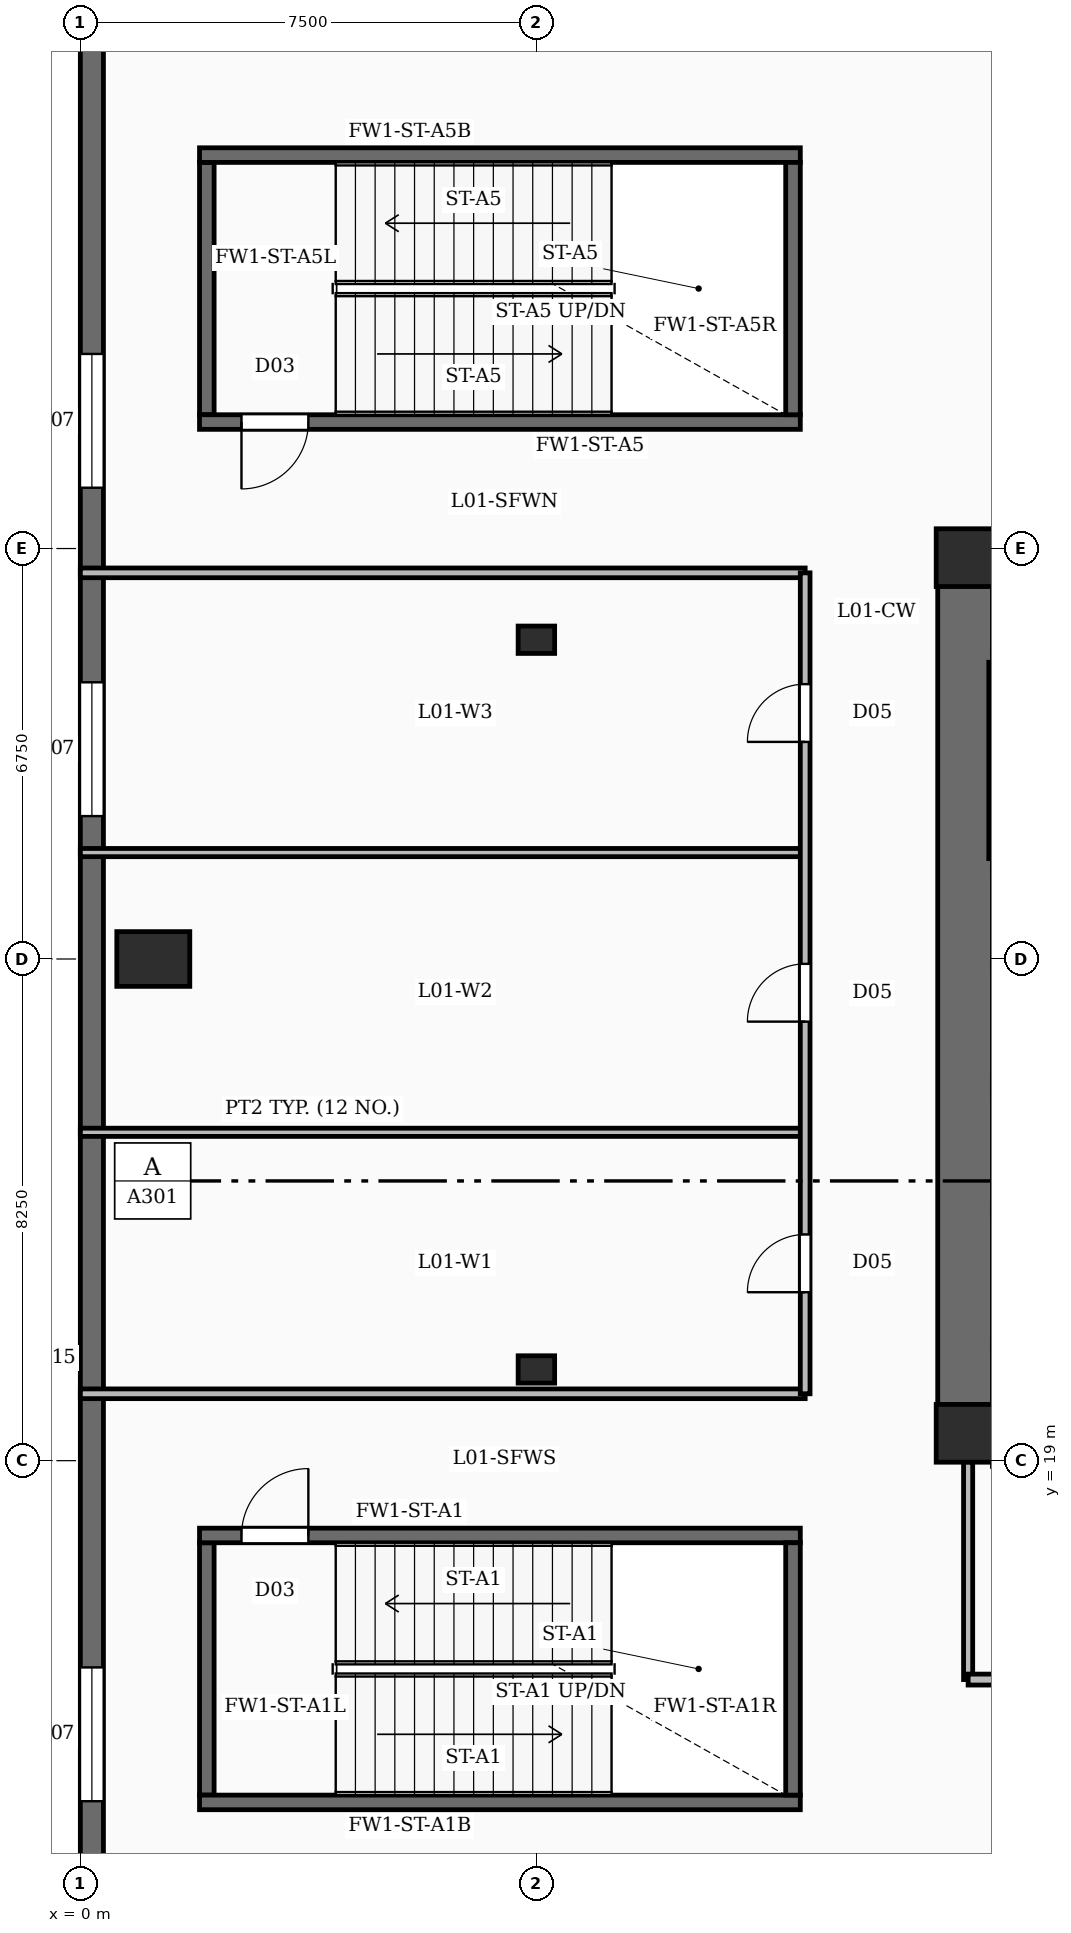
"""IFC4 building model, lengths in metres.
Left out: names, types, materials, properties, quantities, classifications, styles, units other than length and angle.
Written with IfcOpenShell. Run it as: python <this file> out.ifc"""

import sys

from ifc_helpers import new_model, si_unit, direction, frame, frame_2d, origin, origin_2d, place, context, subcontext, project, spatial, rectangle, extrude, element, fill, save


model = new_model("IFC4")
c1 = context("Model", 3, precision=1e-05, world=origin(), true_north=direction((0.0, 1.0)))
c2 = subcontext(c1, "Body", "Model", "MODEL_VIEW")
j1 = project(units=[si_unit("LENGTHUNIT", "METRE"), si_unit("PLANEANGLEUNIT", "RADIAN")], contexts=[c1])
p1 = place(None, origin())
s1 = spatial("IfcSite", under=j1, at=p1, CompositionType="ELEMENT")
p2 = place(p1, origin())
s2 = spatial("IfcBuilding", under=s1, at=p2, CompositionType="ELEMENT")
p3 = place(p2, frame((0.0, 0.0, 8.0)))
s3 = spatial("IfcBuildingStorey", under=s2, at=p3, CompositionType="ELEMENT", Elevation=8.0)
p4 = place(p3, frame((14.55, 19.0, -0.35), z_axis=(0.0, 0.0, 1.0), x_axis=(0.0, 1.0, 0.0)))
e1 = element("IfcWall", 1, at=p4, inside=s3, PredefinedType="SHEAR", context=c2, shape_type="SweptSolid", body=[
    extrude(rectangle(XDim=15.3, YDim=0.9, at=frame_2d((7.65, 0.0))), origin(), (0.0, 0.0, 1.0), 5.0),
])
for number, where, z_axis, x_axis in (
    (2, (14.55, 19.45, -0.35), (0.0, 0.0, 1.0), (1.0, 0.0, 0.0)),
    (3, (14.55, 33.85, -0.35), (0.0, 0.0, 1.0), (1.0, 0.0, 0.0)),
):
    element("IfcColumn", number, at=place(p3, frame(where, z_axis=z_axis, x_axis=x_axis)), inside=s3, PredefinedType="COLUMN", context=c2, shape_type="SweptSolid", body=[
        extrude(rectangle(XDim=0.95, YDim=0.95, at=origin_2d()), origin(), (0.0, 0.0, 1.0), 5.0),
    ])
p5 = place(p3, frame((1.2, 27.25, -0.35), z_axis=(0.0, 0.0, 1.0), x_axis=(1.0, 0.0, 0.0)))
e4 = element("IfcColumn", 4, at=p5, inside=s3, PredefinedType="COLUMN", context=c2, shape_type="SweptSolid", body=[
    extrude(rectangle(XDim=1.2, YDim=0.9, at=origin_2d()), origin(), (0.0, 0.0, 1.0), 5.0),
])
for number, where, z_axis, x_axis in (
    (5, (7.5, 20.5, -0.35), (0.0, 0.0, 1.0), (1.0, 0.0, 0.0)),
    (6, (7.5, 32.5, -0.35), (0.0, 0.0, 1.0), (1.0, 0.0, 0.0)),
):
    element("IfcColumn", number, at=place(p3, frame(where, z_axis=z_axis, x_axis=x_axis)), inside=s3, PredefinedType="PILASTER", context=c2, shape_type="SweptSolid", body=[
        extrude(rectangle(XDim=0.6, YDim=0.45, at=origin_2d()), origin(), (0.0, 0.0, 1.0), 5.0),
    ])
p6 = place(p3, frame((0.19, 5.4, 0.0), z_axis=(0.0, 0.0, 1.0), x_axis=(0.0, 1.0, 0.0)))
e7 = element("IfcWall", 7, at=p6, inside=s3, PredefinedType="SOLIDWALL", context=c2, shape_type="SweptSolid", body=[
    extrude(rectangle(XDim=43.7, YDim=0.38, at=frame_2d((21.85, 0.0))), origin(), (0.0, 0.0, 1.0), 4.65),
])
p7 = place(p6, frame((2.6, 0.0, 0.95)))
e8 = element("IfcOpeningElement", 8, at=p7, cuts=e7, PredefinedType="OPENING", context=c2, shape_type="SweptSolid", body=[
    extrude(rectangle(XDim=2.2, YDim=2.5, at=frame_2d((1.1, 1.25))), frame((0.0, 0.2, 0.0), z_axis=(0.0, -1.0, 0.0), x_axis=(1.0, 0.0, 0.0)), (0.0, 0.0, 1.0), 0.4),
])
p8 = place(p6, frame((8.0, 0.0, 0.95)))
e9 = element("IfcOpeningElement", 9, at=p8, cuts=e7, PredefinedType="OPENING", context=c2, shape_type="SweptSolid", body=[
    extrude(rectangle(XDim=2.2, YDim=2.5, at=frame_2d((1.1, 1.25))), frame((0.0, 0.2, 0.0), z_axis=(0.0, -1.0, 0.0), x_axis=(1.0, 0.0, 0.0)), (0.0, 0.0, 1.0), 0.4),
])
p9 = place(p6, frame((24.2, 0.0, 0.95)))
e10 = element("IfcOpeningElement", 10, at=p9, cuts=e7, PredefinedType="OPENING", context=c2, shape_type="SweptSolid", body=[
    extrude(rectangle(XDim=2.2, YDim=2.5, at=frame_2d((1.1, 1.25))), frame((0.0, 0.2, 0.0), z_axis=(0.0, -1.0, 0.0), x_axis=(1.0, 0.0, 0.0)), (0.0, 0.0, 1.0), 0.4),
])
p10 = place(p6, frame((29.6, 0.0, 0.95)))
e11 = element("IfcOpeningElement", 11, at=p10, cuts=e7, PredefinedType="OPENING", context=c2, shape_type="SweptSolid", body=[
    extrude(rectangle(XDim=2.2, YDim=2.5, at=frame_2d((1.1, 1.25))), frame((0.0, 0.2, 0.0), z_axis=(0.0, -1.0, 0.0), x_axis=(1.0, 0.0, 0.0)), (0.0, 0.0, 1.0), 0.4),
])
p11 = place(p3, frame((1.96, 17.77, 0.0), z_axis=(0.0, 0.0, 1.0), x_axis=(1.0, 0.0, 0.0)))
e12 = element("IfcWall", 12, at=p11, inside=s3, PredefinedType="SOLIDWALL", context=c2, shape_type="SweptSolid", body=[
    extrude(rectangle(XDim=9.88, YDim=0.24, at=frame_2d((4.94, 0.0))), origin(), (0.0, 0.0, 1.0), 4.65),
])
p12 = place(p11, frame((0.69, 0.0, 0.0)))
e13 = element("IfcOpeningElement", 13, at=p12, cuts=e12, PredefinedType="OPENING", context=c2, shape_type="SweptSolid", body=[
    extrude(rectangle(XDim=1.1, YDim=2.15, at=frame_2d((0.55, 1.075))), frame((0.0, 0.13, 0.0), z_axis=(0.0, -1.0, 0.0), x_axis=(1.0, 0.0, 0.0)), (0.0, 0.0, 1.0), 0.26),
])
p13 = place(p3, frame((1.96, 13.38, 0.0), z_axis=(0.0, 0.0, 1.0), x_axis=(1.0, 0.0, 0.0)))
e14 = element("IfcWall", 14, at=p13, inside=s3, PredefinedType="SOLIDWALL", context=c2, shape_type="SweptSolid", body=[
    extrude(rectangle(XDim=9.88, YDim=0.24, at=frame_2d((4.94, 0.0))), origin(), (0.0, 0.0, 1.0), 4.65),
])
for number, where, z_axis, x_axis in (
    (15, (2.08, 13.5, 0.0), (0.0, 0.0, 1.0), (0.0, 1.0, 0.0)),
    (16, (11.72, 13.5, 0.0), (0.0, 0.0, 1.0), (0.0, 1.0, 0.0)),
):
    element("IfcWall", number, at=place(p3, frame(where, z_axis=z_axis, x_axis=x_axis)), inside=s3, PredefinedType="SOLIDWALL", context=c2, shape_type="SweptSolid", body=[
        extrude(rectangle(XDim=4.15, YDim=0.24, at=frame_2d((2.075, 0.0))), origin(), (0.0, 0.0, 1.0), 4.65),
    ])
p14 = place(p3, frame((11.84, 36.08, 0.0), z_axis=(0.0, 0.0, 1.0), x_axis=(-1.0, 0.0, 0.0)))
e17 = element("IfcWall", 17, at=p14, inside=s3, PredefinedType="SOLIDWALL", context=c2, shape_type="SweptSolid", body=[
    extrude(rectangle(XDim=9.88, YDim=0.24, at=frame_2d((4.94, 0.0))), origin(), (0.0, 0.0, 1.0), 4.65),
])
p15 = place(p14, frame((8.09, 0.0, 0.0)))
e18 = element("IfcOpeningElement", 18, at=p15, cuts=e17, PredefinedType="OPENING", context=c2, shape_type="SweptSolid", body=[
    extrude(rectangle(XDim=1.1, YDim=2.15, at=frame_2d((0.55, 1.075))), frame((0.0, 0.13, 0.0), z_axis=(0.0, -1.0, 0.0), x_axis=(1.0, 0.0, 0.0)), (0.0, 0.0, 1.0), 0.26),
])
p16 = place(p3, frame((1.96, 40.47, 0.0), z_axis=(0.0, 0.0, 1.0), x_axis=(1.0, 0.0, 0.0)))
e19 = element("IfcWall", 19, at=p16, inside=s3, PredefinedType="SOLIDWALL", context=c2, shape_type="SweptSolid", body=[
    extrude(rectangle(XDim=9.88, YDim=0.24, at=frame_2d((4.94, 0.0))), origin(), (0.0, 0.0, 1.0), 4.65),
])
for number, where, z_axis, x_axis in (
    (20, (2.08, 36.2, 0.0), (0.0, 0.0, 1.0), (0.0, 1.0, 0.0)),
    (21, (11.72, 36.2, 0.0), (0.0, 0.0, 1.0), (0.0, 1.0, 0.0)),
):
    element("IfcWall", number, at=place(p3, frame(where, z_axis=z_axis, x_axis=x_axis)), inside=s3, PredefinedType="SOLIDWALL", context=c2, shape_type="SweptSolid", body=[
        extrude(rectangle(XDim=4.15, YDim=0.24, at=frame_2d((2.075, 0.0))), origin(), (0.0, 0.0, 1.0), 4.65),
    ])
p17 = place(p3, frame((15.06, 28.9, 0.0), z_axis=(0.0, 0.0, 1.0), x_axis=(0.0, 1.0, 0.0)))
e22 = element("IfcWall", 22, at=p17, inside=s3, PredefinedType="SOLIDWALL", context=c2, shape_type="SweptSolid", body=[
    extrude(rectangle(XDim=3.23, YDim=0.24, at=frame_2d((1.615, 0.0))), origin(), (0.0, 0.0, 1.0), 4.65),
])
p18 = place(p3, frame((14.6, 15.4, 0.0), z_axis=(0.0, 0.0, 1.0), x_axis=(1.0, 0.0, 0.0)))
e23 = element("IfcWall", 23, at=p18, inside=s3, PredefinedType="PARTITIONING", context=c2, shape_type="SweptSolid", body=[
    extrude(rectangle(XDim=9.9, YDim=0.18, at=frame_2d((4.95, 0.0))), origin(), (0.0, 0.0, 1.0), 3.71),
])
p19 = place(p18, frame((1.99, 0.0, 0.0)))
e24 = element("IfcOpeningElement", 24, at=p19, cuts=e23, PredefinedType="OPENING", context=c2, shape_type="SweptSolid", body=[
    extrude(rectangle(XDim=0.92, YDim=2.1, at=frame_2d((0.46, 1.05))), frame((0.0, 0.1, 0.0), z_axis=(0.0, -1.0, 0.0), x_axis=(1.0, 0.0, 0.0)), (0.0, 0.0, 1.0), 0.2),
])
p20 = place(p18, frame((6.94, 0.0, 0.0)))
e25 = element("IfcOpeningElement", 25, at=p20, cuts=e23, PredefinedType="OPENING", context=c2, shape_type="SweptSolid", body=[
    extrude(rectangle(XDim=0.92, YDim=2.1, at=frame_2d((0.46, 1.05))), frame((0.0, 0.1, 0.0), z_axis=(0.0, -1.0, 0.0), x_axis=(1.0, 0.0, 0.0)), (0.0, 0.0, 1.0), 0.2),
])
p21 = place(p3, frame((14.6, 15.4, 0.0), z_axis=(0.0, 0.0, 1.0), x_axis=(0.0, 1.0, 0.0)))
e26 = element("IfcWall", 26, at=p21, inside=s3, PredefinedType="PARTITIONING", context=c2, shape_type="SweptSolid", body=[
    extrude(rectangle(XDim=3.58, YDim=0.15, at=frame_2d((1.79, 0.0))), origin(), (0.0, 0.0, 1.0), 3.71),
])
for number, where, z_axis, x_axis in (
    (27, (0.0, 24.4, 0.0), (0.0, 0.0, 1.0), (1.0, 0.0, 0.0)),
    (28, (0.0, 29.0, 0.0), (0.0, 0.0, 1.0), (1.0, 0.0, 0.0)),
):
    element("IfcWall", number, at=place(p3, frame(where, z_axis=z_axis, x_axis=x_axis)), inside=s3, PredefinedType="PARTITIONING", context=c2, shape_type="SweptSolid", body=[
        extrude(rectangle(XDim=11.92, YDim=0.135, at=frame_2d((5.96, 0.0))), origin(), (0.0, 0.0, 1.0), 3.71),
    ])
p22 = place(p3, frame((11.92, 20.1, 0.0), z_axis=(0.0, 0.0, 1.0), x_axis=(0.0, 1.0, 0.0)))
e29 = element("IfcWall", 29, at=p22, inside=s3, PredefinedType="PARTITIONING", context=c2, shape_type="SweptSolid", body=[
    extrude(rectangle(XDim=13.5, YDim=0.16, at=frame_2d((6.75, 0.0))), origin(), (0.0, 0.0, 1.0), 3.71),
])
p23 = place(p22, frame((1.67, 0.0, 0.0)))
e30 = element("IfcOpeningElement", 30, at=p23, cuts=e29, PredefinedType="OPENING", context=c2, shape_type="SweptSolid", body=[
    extrude(rectangle(XDim=0.95, YDim=2.15, at=frame_2d((0.475, 1.075))), frame((0.0, 0.09, 0.0), z_axis=(0.0, -1.0, 0.0), x_axis=(1.0, 0.0, 0.0)), (0.0, 0.0, 1.0), 0.18),
])
p24 = place(p22, frame((6.12, 0.0, 0.0)))
e31 = element("IfcOpeningElement", 31, at=p24, cuts=e29, PredefinedType="OPENING", context=c2, shape_type="SweptSolid", body=[
    extrude(rectangle(XDim=0.95, YDim=2.15, at=frame_2d((0.475, 1.075))), frame((0.0, 0.09, 0.0), z_axis=(0.0, -1.0, 0.0), x_axis=(1.0, 0.0, 0.0)), (0.0, 0.0, 1.0), 0.18),
])
p25 = place(p22, frame((10.72, 0.0, 0.0)))
e32 = element("IfcOpeningElement", 32, at=p25, cuts=e29, PredefinedType="OPENING", context=c2, shape_type="SweptSolid", body=[
    extrude(rectangle(XDim=0.95, YDim=2.15, at=frame_2d((0.475, 1.075))), frame((0.0, 0.09, 0.0), z_axis=(0.0, -1.0, 0.0), x_axis=(1.0, 0.0, 0.0)), (0.0, 0.0, 1.0), 0.18),
])
for number, where, z_axis, x_axis in (
    (33, (0.0, 20.1, 0.0), (0.0, 0.0, 1.0), (1.0, 0.0, 0.0)),
    (34, (0.0, 33.6, 0.0), (0.0, 0.0, 1.0), (1.0, 0.0, 0.0)),
):
    element("IfcWall", number, at=place(p3, frame(where, z_axis=z_axis, x_axis=x_axis)), inside=s3, PredefinedType="PARTITIONING", context=c2, shape_type="SweptSolid", body=[
        extrude(rectangle(XDim=11.92, YDim=0.16, at=frame_2d((5.96, 0.0))), origin(), (0.0, 0.0, 1.0), 3.71),
    ])
p26 = place(p8, origin())
e35 = element("IfcWindow", 35, at=p26, inside=s3, PartitioningType="DOUBLE_PANEL_VERTICAL", PredefinedType="WINDOW", context=c2, shape_type="SweptSolid", body=[
    extrude(rectangle(XDim=2.2, YDim=2.5, at=frame_2d((1.1, 1.25))), frame((0.0, 0.03, 0.0), z_axis=(0.0, -1.0, 0.0), x_axis=(1.0, 0.0, 0.0)), (0.0, 0.0, 1.0), 0.06),
])
fill(e9, e35)
p27 = place(p9, origin())
e36 = element("IfcWindow", 36, at=p27, inside=s3, PartitioningType="DOUBLE_PANEL_VERTICAL", PredefinedType="WINDOW", context=c2, shape_type="SweptSolid", body=[
    extrude(rectangle(XDim=2.2, YDim=2.5, at=frame_2d((1.1, 1.25))), frame((0.0, 0.03, 0.0), z_axis=(0.0, -1.0, 0.0), x_axis=(1.0, 0.0, 0.0)), (0.0, 0.0, 1.0), 0.06),
])
fill(e10, e36)
p28 = place(p10, origin())
e37 = element("IfcWindow", 37, at=p28, inside=s3, PartitioningType="DOUBLE_PANEL_VERTICAL", PredefinedType="WINDOW", context=c2, shape_type="SweptSolid", body=[
    extrude(rectangle(XDim=2.2, YDim=2.5, at=frame_2d((1.1, 1.25))), frame((0.0, 0.03, 0.0), z_axis=(0.0, -1.0, 0.0), x_axis=(1.0, 0.0, 0.0)), (0.0, 0.0, 1.0), 0.06),
])
fill(e11, e37)
p29 = place(p12, origin())
e38 = element("IfcDoor", 38, at=p29, inside=s3, OperationType="SINGLE_SWING_RIGHT", PredefinedType="DOOR", context=c2, shape_type="SweptSolid", body=[
    extrude(rectangle(XDim=1.1, YDim=2.15, at=frame_2d((0.55, 1.075))), frame((0.0, 0.025, 0.0), z_axis=(0.0, -1.0, 0.0), x_axis=(1.0, 0.0, 0.0)), (0.0, 0.0, 1.0), 0.05),
])
fill(e13, e38)
p30 = place(p15, origin())
e39 = element("IfcDoor", 39, at=p30, inside=s3, OperationType="SINGLE_SWING_RIGHT", PredefinedType="DOOR", context=c2, shape_type="SweptSolid", body=[
    extrude(rectangle(XDim=1.1, YDim=2.15, at=frame_2d((0.55, 1.075))), frame((0.0, 0.025, 0.0), z_axis=(0.0, -1.0, 0.0), x_axis=(1.0, 0.0, 0.0)), (0.0, 0.0, 1.0), 0.05),
])
fill(e18, e39)
p31 = place(p23, origin())
e40 = element("IfcDoor", 40, at=p31, inside=s3, OperationType="SINGLE_SWING_LEFT", PredefinedType="DOOR", context=c2, shape_type="SweptSolid", body=[
    extrude(rectangle(XDim=0.95, YDim=2.15, at=frame_2d((0.475, 1.075))), frame((0.0, 0.025, 0.0), z_axis=(0.0, -1.0, 0.0), x_axis=(1.0, 0.0, 0.0)), (0.0, 0.0, 1.0), 0.05),
])
fill(e30, e40)
p32 = place(p24, origin())
e41 = element("IfcDoor", 41, at=p32, inside=s3, OperationType="SINGLE_SWING_LEFT", PredefinedType="DOOR", context=c2, shape_type="SweptSolid", body=[
    extrude(rectangle(XDim=0.95, YDim=2.15, at=frame_2d((0.475, 1.075))), frame((0.0, 0.025, 0.0), z_axis=(0.0, -1.0, 0.0), x_axis=(1.0, 0.0, 0.0)), (0.0, 0.0, 1.0), 0.05),
])
fill(e31, e41)
p33 = place(p25, origin())
e42 = element("IfcDoor", 42, at=p33, inside=s3, OperationType="SINGLE_SWING_LEFT", PredefinedType="DOOR", context=c2, shape_type="SweptSolid", body=[
    extrude(rectangle(XDim=0.95, YDim=2.15, at=frame_2d((0.475, 1.075))), frame((0.0, 0.025, 0.0), z_axis=(0.0, -1.0, 0.0), x_axis=(1.0, 0.0, 0.0)), (0.0, 0.0, 1.0), 0.05),
])
fill(e32, e42)
save(model, sys.argv[1])
